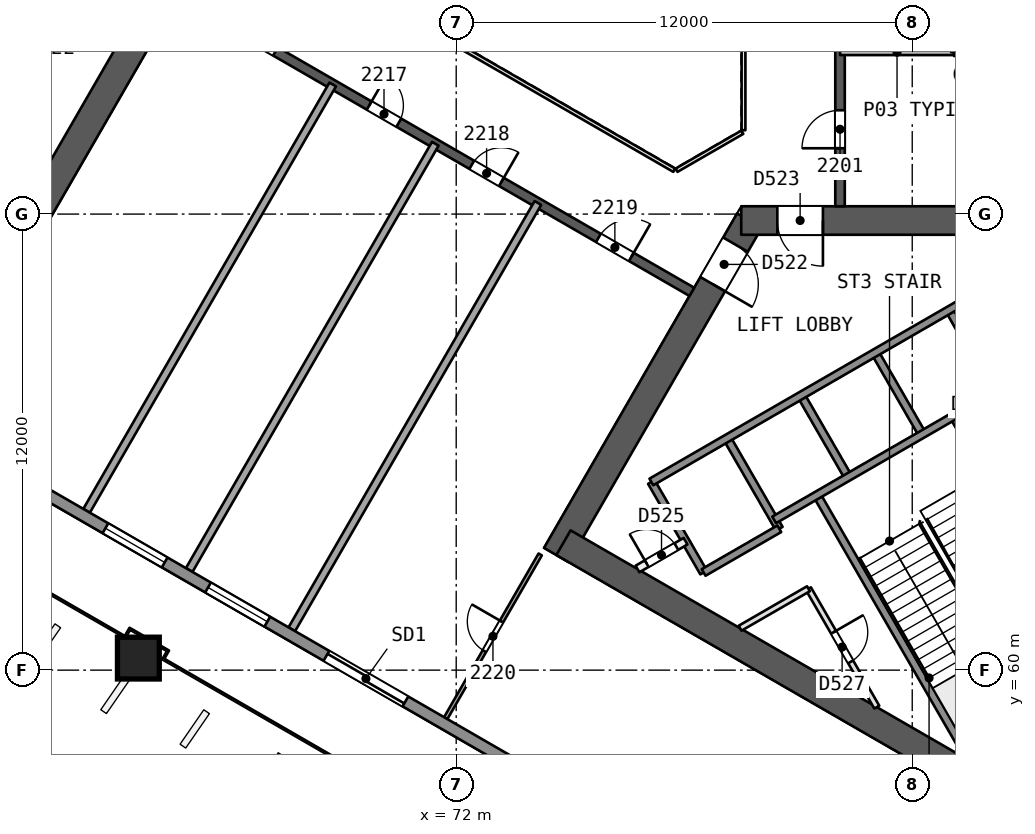
"""IFC4 building model, lengths in metres.
Left out: names, types, materials, properties, quantities, classifications, styles, units other than length and angle.
Written with IfcOpenShell. Run it as: python <this file> out.ifc"""

import sys

from ifc_helpers import new_model, si_unit, direction, frame, frame_2d, origin, origin_2d, place, context, subcontext, project, spatial, rectangle, extrude, element, fill, save


model = new_model("IFC4")
c1 = context("Model", 3, precision=1e-05, world=origin(), true_north=direction((0.0, 1.0)))
c2 = subcontext(c1, "Body", "Model", "MODEL_VIEW")
j1 = project(units=[si_unit("LENGTHUNIT", "METRE"), si_unit("PLANEANGLEUNIT", "RADIAN")], contexts=[c1])
p1 = place(None, origin())
s1 = spatial("IfcSite", under=j1, at=p1, CompositionType="ELEMENT")
p2 = place(p1, origin())
s2 = spatial("IfcBuilding", under=s1, at=p2, CompositionType="ELEMENT")
p3 = place(p2, frame((0.0, 0.0, 94.3)))
s3 = spatial("IfcBuildingStorey", under=s2, at=p3, CompositionType="ELEMENT", Elevation=94.3)
p4 = place(p3, frame((60.673, 71.523, 0.0), z_axis=(0.0, 0.0, 1.0), x_axis=(0.499997052475, 0.866027105532, 0.0)))
e1 = element("IfcWall", 1, at=p4, inside=s3, PredefinedType="SHEAR", context=c2, shape_type="SweptSolid", body=[
    extrude(rectangle(XDim=10.005, YDim=0.75, at=frame_2d((5.002, 0.0))), origin(), (0.0, 0.0, 1.0), 3.7),
])
p5 = place(p4, frame((7.855, 0.0, 0.0)))
e2 = element("IfcOpeningElement", 2, at=p5, cuts=e1, PredefinedType="OPENING", context=c2, shape_type="SweptSolid", body=[
    extrude(rectangle(XDim=1.2, YDim=2.1, at=frame_2d((0.6, 1.05))), frame((0.0, 0.385, 0.0), z_axis=(0.0, -1.0, 0.0), x_axis=(1.0, 0.0, 0.0)), (0.0, 0.0, 1.0), 0.771),
])
p6 = place(p3, frame((79.717, 71.831, 0.0), z_axis=(0.0, 0.0, 1.0), x_axis=(-0.499996230114, -0.866027580318, 0.0)))
e3 = element("IfcWall", 3, at=p6, inside=s3, PredefinedType="SHEAR", context=c2, shape_type="SweptSolid", body=[
    extrude(rectangle(XDim=10.164, YDim=0.75, at=frame_2d((5.082, 0.0))), origin(), (0.0, 0.0, 1.0), 3.7),
])
p7 = place(p6, frame((0.733, 0.0, 0.0)))
e4 = element("IfcOpeningElement", 4, at=p7, cuts=e3, PredefinedType="OPENING", context=c2, shape_type="SweptSolid", body=[
    extrude(rectangle(XDim=1.2, YDim=2.1, at=frame_2d((0.6, 1.05))), frame((0.0, 0.385, 0.0), z_axis=(0.0, -1.0, 0.0), x_axis=(1.0, 0.0, 0.0)), (0.0, 0.0, 1.0), 0.771),
])
p8 = place(p3, frame((74.822, 63.354, 0.0), z_axis=(0.0, 0.0, 1.0), x_axis=(0.8660248072, -0.500001033313, 0.0)))
e5 = element("IfcWall", 5, at=p8, inside=s3, PredefinedType="SHEAR", context=c2, shape_type="SweptSolid", body=[
    extrude(rectangle(XDim=13.958, YDim=0.75, at=frame_2d((6.979, 0.0))), origin(), (0.0, 0.0, 1.0), 3.7),
])
p9 = place(p3, frame((89.505, 71.831, 0.0), z_axis=(0.0, 0.0, 1.0), x_axis=(-1.0, 0.0, 0.0)))
e6 = element("IfcWall", 6, at=p9, inside=s3, PredefinedType="SHEAR", context=c2, shape_type="SweptSolid", body=[
    extrude(rectangle(XDim=10.005, YDim=0.75, at=frame_2d((5.002, 0.0))), origin(), (0.0, 0.0, 1.0), 3.7),
])
p10 = place(p9, frame((7.855, 0.0, 0.0)))
e7 = element("IfcOpeningElement", 7, at=p10, cuts=e6, PredefinedType="OPENING", context=c2, shape_type="SweptSolid", body=[
    extrude(rectangle(XDim=1.2, YDim=2.1, at=frame_2d((0.6, 1.05))), frame((0.0, 0.385, 0.0), z_axis=(0.0, -1.0, 0.0), x_axis=(1.0, 0.0, 0.0)), (0.0, 0.0, 1.0), 0.771),
])
p11 = place(p3, frame((82.1, 72.206, 0.0), z_axis=(0.0, 0.0, 1.0), x_axis=(0.0, 1.0, 0.0)))
e8 = element("IfcWall", 8, at=p11, inside=s3, PredefinedType="SHEAR", context=c2, shape_type="SweptSolid", body=[
    extrude(rectangle(XDim=15.588, YDim=0.25, at=frame_2d((7.794, 0.0))), origin(), (0.0, 0.0, 1.0), 3.25),
])
p12 = place(p11, frame((1.527, 0.0, 0.0)))
e9 = element("IfcOpeningElement", 9, at=p12, cuts=e8, PredefinedType="OPENING", context=c2, shape_type="SweptSolid", body=[
    extrude(rectangle(XDim=1.0, YDim=2.1, at=frame_2d((0.5, 1.05))), frame((0.0, 0.135, 0.0), z_axis=(0.0, -1.0, 0.0), x_axis=(1.0, 0.0, 0.0)), (0.0, 0.0, 1.0), 0.271),
])
p13 = place(p11, frame((8.694, 0.0, 0.0)))
e10 = element("IfcOpeningElement", 10, at=p13, cuts=e8, PredefinedType="OPENING", context=c2, shape_type="SweptSolid", body=[
    extrude(rectangle(XDim=1.1, YDim=2.1, at=frame_2d((0.55, 1.05))), frame((0.0, 0.135, 0.0), z_axis=(0.0, -1.0, 0.0), x_axis=(1.0, 0.0, 0.0)), (0.0, 0.0, 1.0), 0.271),
])
p14 = place(p11, frame((13.062, 0.0, 0.0)))
e11 = element("IfcOpeningElement", 11, at=p14, cuts=e8, PredefinedType="OPENING", context=c2, shape_type="SweptSolid", body=[
    extrude(rectangle(XDim=1.0, YDim=2.1, at=frame_2d((0.5, 1.05))), frame((0.0, 0.135, 0.0), z_axis=(0.0, -1.0, 0.0), x_axis=(1.0, 0.0, 0.0)), (0.0, 0.0, 1.0), 0.271),
])
p15 = place(p3, frame((64.7, 77.748, 0.0), z_axis=(0.0, 0.0, 1.0), x_axis=(0.866026492143, -0.499998114903, 0.0)))
e12 = element("IfcWall", 12, at=p15, inside=s3, PredefinedType="SHEAR", context=c2, shape_type="SweptSolid", body=[
    extrude(rectangle(XDim=15.588, YDim=0.25, at=frame_2d((7.794, 0.0))), origin(), (0.0, 0.0, 1.0), 3.25),
])
p16 = place(p15, frame((1.738, 0.0, 0.0)))
e13 = element("IfcOpeningElement", 13, at=p16, cuts=e12, PredefinedType="OPENING", context=c2, shape_type="SweptSolid", body=[
    extrude(rectangle(XDim=1.2, YDim=2.4, at=frame_2d((0.6, 1.2))), frame((0.0, 0.135, 0.0), z_axis=(0.0, -1.0, 0.0), x_axis=(1.0, 0.0, 0.0)), (0.0, 0.0, 1.0), 0.271),
])
p17 = place(p15, frame((5.785, 0.0, 0.0)))
e14 = element("IfcOpeningElement", 14, at=p17, cuts=e12, PredefinedType="OPENING", context=c2, shape_type="SweptSolid", body=[
    extrude(rectangle(XDim=0.9, YDim=2.1, at=frame_2d((0.45, 1.05))), frame((0.0, 0.135, 0.0), z_axis=(0.0, -1.0, 0.0), x_axis=(1.0, 0.0, 0.0)), (0.0, 0.0, 1.0), 0.271),
])
p18 = place(p15, frame((8.903, 0.0, 0.0)))
e15 = element("IfcOpeningElement", 15, at=p18, cuts=e12, PredefinedType="OPENING", context=c2, shape_type="SweptSolid", body=[
    extrude(rectangle(XDim=0.9, YDim=2.1, at=frame_2d((0.45, 1.05))), frame((0.0, 0.135, 0.0), z_axis=(0.0, -1.0, 0.0), x_axis=(1.0, 0.0, 0.0)), (0.0, 0.0, 1.0), 0.271),
])
p19 = place(p15, frame((12.75, 0.0, 0.0)))
e16 = element("IfcOpeningElement", 16, at=p19, cuts=e12, PredefinedType="OPENING", context=c2, shape_type="SweptSolid", body=[
    extrude(rectangle(XDim=1.0, YDim=2.1, at=frame_2d((0.5, 1.05))), frame((0.0, 0.135, 0.0), z_axis=(0.0, -1.0, 0.0), x_axis=(1.0, 0.0, 0.0)), (0.0, 0.0, 1.0), 0.271),
])
p20 = place(p3, frame((63.624, 60.296, 0.0), z_axis=(0.010093620709, 0.017482414954, 0.999796221231), x_axis=(-0.86603178719, 0.499988943453, 3.82278e-07)))
e17 = element("IfcColumn", 17, at=p20, inside=s3, PredefinedType="COLUMN", context=c2, shape_type="SweptSolid", body=[
    extrude(rectangle(XDim=1.1, YDim=1.1, at=origin_2d()), origin(), (0.0, 0.0, 1.0), 3.701),
])
p21 = place(p3, frame((95.053, 76.259, 0.0), z_axis=(0.0, 0.0, 1.0), x_axis=(-1.0, 0.0, 0.0)))
e18 = element("IfcWall", 18, at=p21, inside=s3, PredefinedType="PARTITIONING", context=c2, shape_type="SweptSolid", body=[
    extrude(rectangle(XDim=9.953, YDim=0.2, at=frame_2d((4.976, 0.0))), origin(), (0.0, 0.0, 1.0), 3.25),
])
p22 = place(p3, frame((85.1, 76.259, 0.0), z_axis=(0.0, 0.0, 1.0), x_axis=(-1.0, 0.0, 0.0)))
e19 = element("IfcWall", 19, at=p22, inside=s3, PredefinedType="PARTITIONING", context=c2, shape_type="SweptSolid", body=[
    extrude(rectangle(XDim=3.0, YDim=0.15, at=frame_2d((1.5, 0.0))), origin(), (0.0, 0.0, 1.0), 3.25),
])
for number, where, z_axis, x_axis in (
    (20, (62.274, 64.193, 0.0), (0.0, 0.0, 1.0), (0.5, 0.866, 0.0)),
    (21, (64.974, 62.634, 0.0), (0.0, 0.0, 1.0), (0.5, 0.866, 0.0)),
    (22, (67.674, 61.075, 0.0), (0.0, 0.0, 1.0), (0.5, 0.866, 0.0)),
):
    element("IfcWall", number, at=place(p3, frame(where, z_axis=z_axis, x_axis=x_axis)), inside=s3, PredefinedType="PARTITIONING", context=c2, shape_type="SweptSolid", body=[
        extrude(rectangle(XDim=12.953, YDim=0.2, at=frame_2d((6.477, 0.0))), origin(), (0.0, 0.0, 1.0), 3.25),
    ])
p23 = place(p3, frame((71.724, 58.737, 0.0), z_axis=(0.0, 0.0, 1.0), x_axis=(0.499971721724, 0.866041729639, 0.0)))
e23 = element("IfcWall", 23, at=p23, inside=s3, PredefinedType="PARTITIONING", context=c2, shape_type="SweptSolid", body=[
    extrude(rectangle(XDim=4.974, YDim=0.1, at=frame_2d((2.487, 0.0))), origin(), (0.0, 0.0, 1.0), 3.25),
])
p24 = place(p23, frame((2.037, 0.0, 0.0)))
e24 = element("IfcOpeningElement", 24, at=p24, cuts=e23, PredefinedType="OPENING", context=c2, shape_type="SweptSolid", body=[
    extrude(rectangle(XDim=0.9, YDim=2.1, at=frame_2d((0.45, 1.05))), frame((0.0, 0.061, 0.0), z_axis=(0.0, -1.0, 0.0), x_axis=(1.0, 0.0, 0.0)), (0.0, 0.0, 1.0), 0.121),
])
p25 = place(p3, frame((90.054, 47.981, 0.0), z_axis=(0.0, 0.0, 1.0), x_axis=(-0.866025390357, 0.500000023256, 0.0)))
e25 = element("IfcWall", 25, at=p25, inside=s3, PredefinedType="SOLIDWALL", context=c2, shape_type="SweptSolid", body=[
    extrude(rectangle(XDim=58.093, YDim=0.3, at=frame_2d((29.046, 0.0))), origin(), (0.0, 0.0, 1.0), 3.25),
])
p26 = place(p25, frame((43.972, 0.0, 0.0)))
e26 = element("IfcOpeningElement", 26, at=p26, cuts=e25, PredefinedType="OPENING", context=c2, shape_type="SweptSolid", body=[
    extrude(rectangle(XDim=2.4, YDim=2.4, at=frame_2d((1.2, 1.2))), frame((0.0, 0.161, 0.0), z_axis=(0.0, -1.0, 0.0), x_axis=(1.0, 0.0, 0.0)), (0.0, 0.0, 1.0), 0.321),
])
p27 = place(p25, frame((22.39, 0.0, 0.0)))
e27 = element("IfcOpeningElement", 27, at=p27, cuts=e25, PredefinedType="OPENING", context=c2, shape_type="SweptSolid", body=[
    extrude(rectangle(XDim=2.4, YDim=2.4, at=frame_2d((1.2, 1.2))), frame((0.0, 0.161, 0.0), z_axis=(0.0, -1.0, 0.0), x_axis=(1.0, 0.0, 0.0)), (0.0, 0.0, 1.0), 0.321),
])
p28 = place(p25, frame((10.643, 0.0, 0.0)))
e28 = element("IfcOpeningElement", 28, at=p28, cuts=e25, PredefinedType="OPENING", context=c2, shape_type="SweptSolid", body=[
    extrude(rectangle(XDim=2.4, YDim=2.4, at=frame_2d((1.2, 1.2))), frame((0.0, 0.161, 0.0), z_axis=(0.0, -1.0, 0.0), x_axis=(1.0, 0.0, 0.0)), (0.0, 0.0, 1.0), 0.321),
])
p29 = place(p25, frame((29.705, 0.0, 0.9)))
e29 = element("IfcOpeningElement", 29, at=p29, cuts=e25, PredefinedType="OPENING", context=c2, shape_type="SweptSolid", body=[
    extrude(rectangle(XDim=1.8, YDim=1.5, at=frame_2d((0.9, 0.75))), frame((0.0, 0.161, 0.0), z_axis=(0.0, -1.0, 0.0), x_axis=(1.0, 0.0, 0.0)), (0.0, 0.0, 1.0), 0.321),
])
p30 = place(p25, frame((26.587, 0.0, 0.9)))
e30 = element("IfcOpeningElement", 30, at=p30, cuts=e25, PredefinedType="OPENING", context=c2, shape_type="SweptSolid", body=[
    extrude(rectangle(XDim=1.8, YDim=1.5, at=frame_2d((0.9, 0.75))), frame((0.0, 0.161, 0.0), z_axis=(0.0, -1.0, 0.0), x_axis=(1.0, 0.0, 0.0)), (0.0, 0.0, 1.0), 0.321),
])
p31 = place(p3, frame((77.135, 64.952, 0.0), z_axis=(0.0, 0.0, 1.0), x_axis=(0.499996545922, -0.866027397988, 0.0)))
e31 = element("IfcWall", 31, at=p31, inside=s3, PredefinedType="SOLIDWALL", context=c2, shape_type="SweptSolid", body=[
    extrude(rectangle(XDim=2.75, YDim=0.2, at=frame_2d((1.375, 0.0))), origin(), (0.0, 0.0, 1.0), 3.25),
])
p32 = place(p3, frame((81.269, 62.142, 0.0), z_axis=(0.0, 0.0, 1.0), x_axis=(0.500043557135, -0.866000254601, 0.0)))
e32 = element("IfcWall", 32, at=p32, inside=s3, PredefinedType="PARTITIONING", context=c2, shape_type="SweptSolid", body=[
    extrude(rectangle(XDim=3.598, YDim=0.15, at=frame_2d((1.799, 0.0))), origin(), (0.0, 0.0, 1.0), 3.25),
])
p33 = place(p32, frame((1.322, 0.0, 0.0)))
e33 = element("IfcOpeningElement", 33, at=p33, cuts=e32, PredefinedType="OPENING", context=c2, shape_type="SweptSolid", body=[
    extrude(rectangle(XDim=0.9, YDim=2.1, at=frame_2d((0.45, 1.05))), frame((0.0, 0.085, 0.0), z_axis=(0.0, -1.0, 0.0), x_axis=(1.0, 0.0, 0.0)), (0.0, 0.0, 1.0), 0.171),
])
p34 = place(p3, frame((79.127, 66.102, 0.0), z_axis=(0.0, 0.0, 1.0), x_axis=(0.499996545922, -0.866027397988, 0.0)))
e34 = element("IfcWall", 34, at=p34, inside=s3, PredefinedType="SOLIDWALL", context=c2, shape_type="SweptSolid", body=[
    extrude(rectangle(XDim=2.75, YDim=0.2, at=frame_2d((1.375, 0.0))), origin(), (0.0, 0.0, 1.0), 3.25),
])
p35 = place(p3, frame((81.493, 64.604, 0.0), z_axis=(0.0, 0.0, 1.0), x_axis=(0.500006057782, -0.866021906294, 0.0)))
e35 = element("IfcWall", 35, at=p35, inside=s3, PredefinedType="SOLIDWALL", context=c2, shape_type="SweptSolid", body=[
    extrude(rectangle(XDim=7.7, YDim=0.2, at=frame_2d((3.85, 0.0))), origin(), (0.0, 0.0, 1.0), 3.25),
])
for number, where, z_axis, x_axis in (
    (36, (81.076, 67.227, 0.0), (0.0, 0.0, 1.0), (0.5, -0.866, 0.0)),
    (37, (83.024, 68.352, 0.0), (0.0, 0.0, 1.0), (0.5, -0.866, 0.0)),
):
    element("IfcWall", number, at=place(p3, frame(where, z_axis=z_axis, x_axis=x_axis)), inside=s3, PredefinedType="SOLIDWALL", context=c2, shape_type="SweptSolid", body=[
        extrude(rectangle(XDim=2.48, YDim=0.2, at=frame_2d((1.24, 0.0))), origin(), (0.0, 0.0, 1.0), 3.25),
    ])
p36 = place(p3, frame((85.087, 66.679, 0.0), z_axis=(0.0, 0.0, 1.0), x_axis=(0.500019787375, -0.866013979237, 0.0)))
e38 = element("IfcWall", 38, at=p36, inside=s3, PredefinedType="SOLIDWALL", context=c2, shape_type="SweptSolid", body=[
    extrude(rectangle(XDim=7.7, YDim=0.2, at=frame_2d((3.85, 0.0))), origin(), (0.0, 0.0, 1.0), 3.25),
])
p37 = place(p36, frame((0.55, 0.0, 0.0)))
e39 = element("IfcOpeningElement", 39, at=p37, cuts=e38, PredefinedType="OPENING", context=c2, shape_type="SweptSolid", body=[
    extrude(rectangle(XDim=1.1, YDim=2.1, at=frame_2d((0.55, 1.05))), frame((0.0, 0.11, 0.0), z_axis=(0.0, -1.0, 0.0), x_axis=(1.0, 0.0, 0.0)), (0.0, 0.0, 1.0), 0.221),
])
p38 = place(p3, frame((84.973, 69.477, 0.0), z_axis=(0.0, 0.0, 1.0), x_axis=(0.499996545922, -0.866027397988, 0.0)))
e40 = element("IfcWall", 40, at=p38, inside=s3, PredefinedType="SOLIDWALL", context=c2, shape_type="SweptSolid", body=[
    extrude(rectangle(XDim=2.75, YDim=0.2, at=frame_2d((1.375, 0.0))), origin(), (0.0, 0.0, 1.0), 3.25),
])
p39 = place(p3, frame((77.135, 64.952, 0.0), z_axis=(0.0, 0.0, 1.0), x_axis=(0.866031916153, 0.499988720078, 0.0)))
e41 = element("IfcWall", 41, at=p39, inside=s3, PredefinedType="SOLIDWALL", context=c2, shape_type="SweptSolid", body=[
    extrude(rectangle(XDim=11.35, YDim=0.2, at=frame_2d((5.675, 0.0))), origin(), (0.0, 0.0, 1.0), 3.25),
])
p40 = place(p3, frame((76.77, 62.662, 0.0), z_axis=(0.0, 0.0, 1.0), x_axis=(0.866054810376, 0.49994906283, 0.0)))
e42 = element("IfcWall", 42, at=p40, inside=s3, PredefinedType="PARTITIONING", context=c2, shape_type="SweptSolid", body=[
    extrude(rectangle(XDim=1.461, YDim=0.2, at=frame_2d((0.73, 0.0))), origin(), (0.0, 0.0, 1.0), 3.25),
])
p41 = place(p40, frame((0.281, 0.0, 0.0)))
e43 = element("IfcOpeningElement", 43, at=p41, cuts=e42, PredefinedType="OPENING", context=c2, shape_type="SweptSolid", body=[
    extrude(rectangle(XDim=0.9, YDim=2.1, at=frame_2d((0.45, 1.05))), frame((0.0, 0.11, 0.0), z_axis=(0.0, -1.0, 0.0), x_axis=(1.0, 0.0, 0.0)), (0.0, 0.0, 1.0), 0.221),
])
p42 = place(p3, frame((80.367, 63.954, 0.0), z_axis=(0.0, 0.0, 1.0), x_axis=(0.866026575979, 0.499997969693, 0.0)))
e44 = element("IfcWall", 44, at=p42, inside=s3, PredefinedType="SOLIDWALL", context=c2, shape_type="SweptSolid", body=[
    extrude(rectangle(XDim=6.75, YDim=0.2, at=frame_2d((3.375, 0.0))), origin(), (0.0, 0.0, 1.0), 3.25),
])
p43 = place(p3, frame((78.51, 62.57, 0.0), z_axis=(0.0, 0.0, 1.0), x_axis=(0.866053019151, 0.499952165731, 0.0)))
e45 = element("IfcWall", 45, at=p43, inside=s3, PredefinedType="SOLIDWALL", context=c2, shape_type="SweptSolid", body=[
    extrude(rectangle(XDim=2.3, YDim=0.2, at=frame_2d((1.15, 0.0))), origin(), (0.0, 0.0, 1.0), 3.25),
])
p44 = place(p3, frame((79.47, 61.103, 0.0), z_axis=(0.0, 0.0, 1.0), x_axis=(0.866021168401, 0.500007335828, 0.0)))
e46 = element("IfcWall", 46, at=p44, inside=s3, PredefinedType="PARTITIONING", context=c2, shape_type="SweptSolid", body=[
    extrude(rectangle(XDim=2.077, YDim=0.15, at=frame_2d((1.039, 0.0))), origin(), (0.0, 0.0, 1.0), 3.25),
])
for number, where, z_axis, x_axis in (
    (47, (79.56, 74.206, 0.0), (0.0, 0.0, 1.0), (0.0, 1.0, 0.0)),
    (48, (67.702, 78.948, 0.0), (0.0, 0.0, 1.0), (0.866, -0.5, 0.0)),
):
    element("IfcWall", number, at=place(p3, frame(where, z_axis=z_axis, x_axis=x_axis)), inside=s3, PredefinedType="PARTITIONING", context=c2, shape_type="SweptSolid", body=[
        extrude(rectangle(XDim=11.588, YDim=0.1, at=frame_2d((5.794, 0.0))), origin(), (0.0, 0.0, 1.0), 3.25),
    ])
p45 = place(p3, frame((77.798, 73.154, 0.0), z_axis=(0.0, 0.0, 1.0), x_axis=(0.866041268327, 0.499972520799, 0.0)))
e49 = element("IfcWall", 49, at=p45, inside=s3, PredefinedType="PARTITIONING", context=c2, shape_type="SweptSolid", body=[
    extrude(rectangle(XDim=2.0, YDim=0.1, at=frame_2d((1.0, 0.0))), origin(), (0.0, 0.0, 1.0), 3.25),
])
p46 = place(p12, origin())
e50 = element("IfcDoor", 50, at=p46, inside=s3, OperationType="SINGLE_SWING_LEFT", PredefinedType="NOTDEFINED", context=c2, shape_type="SweptSolid", body=[
    extrude(rectangle(XDim=1.0, YDim=2.1, at=frame_2d((0.5, 1.05))), frame((0.0, 0.025, 0.0), z_axis=(0.0, -1.0, 0.0), x_axis=(1.0, 0.0, 0.0)), (0.0, 0.0, 1.0), 0.05),
])
fill(e9, e50)
p47 = place(p17, origin())
e51 = element("IfcDoor", 51, at=p47, inside=s3, OperationType="SINGLE_SWING_LEFT", PredefinedType="NOTDEFINED", context=c2, shape_type="SweptSolid", body=[
    extrude(rectangle(XDim=0.9, YDim=2.1, at=frame_2d((0.45, 1.05))), frame((0.0, 0.025, 0.0), z_axis=(0.0, -1.0, 0.0), x_axis=(1.0, 0.0, 0.0)), (0.0, 0.0, 1.0), 0.05),
])
fill(e14, e51)
p48 = place(p18, origin())
e52 = element("IfcDoor", 52, at=p48, inside=s3, OperationType="SINGLE_SWING_RIGHT", PredefinedType="NOTDEFINED", context=c2, shape_type="SweptSolid", body=[
    extrude(rectangle(XDim=0.9, YDim=2.1, at=frame_2d((0.45, 1.05))), frame((0.0, 0.025, 0.0), z_axis=(0.0, -1.0, 0.0), x_axis=(1.0, 0.0, 0.0)), (0.0, 0.0, 1.0), 0.05),
])
fill(e15, e52)
p49 = place(p19, origin())
e53 = element("IfcDoor", 53, at=p49, inside=s3, OperationType="SINGLE_SWING_RIGHT", PredefinedType="NOTDEFINED", context=c2, shape_type="SweptSolid", body=[
    extrude(rectangle(XDim=1.0, YDim=2.1, at=frame_2d((0.5, 1.05))), frame((0.0, 0.025, 0.0), z_axis=(0.0, -1.0, 0.0), x_axis=(1.0, 0.0, 0.0)), (0.0, 0.0, 1.0), 0.05),
])
fill(e16, e53)
p50 = place(p24, origin())
e54 = element("IfcDoor", 54, at=p50, inside=s3, OperationType="SINGLE_SWING_RIGHT", PredefinedType="NOTDEFINED", context=c2, shape_type="SweptSolid", body=[
    extrude(rectangle(XDim=0.9, YDim=2.1, at=frame_2d((0.45, 1.05))), frame((0.0, 0.025, 0.0), z_axis=(0.0, -1.0, 0.0), x_axis=(1.0, 0.0, 0.0)), (0.0, 0.0, 1.0), 0.05),
])
fill(e24, e54)
p51 = place(p27, origin())
e55 = element("IfcDoor", 55, at=p51, inside=s3, OperationType="SLIDING_TO_RIGHT", PredefinedType="NOTDEFINED", context=c2, shape_type="SweptSolid", body=[
    extrude(rectangle(XDim=2.4, YDim=2.4, at=frame_2d((1.2, 1.2))), frame((0.0, 0.025, 0.0), z_axis=(0.0, -1.0, 0.0), x_axis=(1.0, 0.0, 0.0)), (0.0, 0.0, 1.0), 0.05),
])
fill(e27, e55)
p52 = place(p29, origin())
e56 = element("IfcWindow", 56, at=p52, inside=s3, PartitioningType="SINGLE_PANEL", PredefinedType="WINDOW", context=c2, shape_type="SweptSolid", body=[
    extrude(rectangle(XDim=1.8, YDim=1.5, at=frame_2d((0.9, 0.75))), frame((0.0, 0.03, 0.0), z_axis=(0.0, -1.0, 0.0), x_axis=(1.0, 0.0, 0.0)), (0.0, 0.0, 1.0), 0.06),
])
fill(e29, e56)
p53 = place(p30, origin())
e57 = element("IfcWindow", 57, at=p53, inside=s3, PartitioningType="SINGLE_PANEL", PredefinedType="WINDOW", context=c2, shape_type="SweptSolid", body=[
    extrude(rectangle(XDim=1.8, YDim=1.5, at=frame_2d((0.9, 0.75))), frame((0.0, 0.03, 0.0), z_axis=(0.0, -1.0, 0.0), x_axis=(1.0, 0.0, 0.0)), (0.0, 0.0, 1.0), 0.06),
])
fill(e30, e57)
p54 = place(p7, origin())
e58 = element("IfcDoor", 58, at=p54, inside=s3, OperationType="SINGLE_SWING_RIGHT", PredefinedType="NOTDEFINED", context=c2, shape_type="SweptSolid", body=[
    extrude(rectangle(XDim=1.2, YDim=2.1, at=frame_2d((0.6, 1.05))), frame((0.0, 0.025, 0.0), z_axis=(0.0, -1.0, 0.0), x_axis=(1.0, 0.0, 0.0)), (0.0, 0.0, 1.0), 0.05),
])
fill(e4, e58)
p55 = place(p10, origin())
e59 = element("IfcDoor", 59, at=p55, inside=s3, OperationType="SINGLE_SWING_LEFT", PredefinedType="NOTDEFINED", context=c2, shape_type="SweptSolid", body=[
    extrude(rectangle(XDim=1.2, YDim=2.1, at=frame_2d((0.6, 1.05))), frame((0.0, 0.025, 0.0), z_axis=(0.0, -1.0, 0.0), x_axis=(1.0, 0.0, 0.0)), (0.0, 0.0, 1.0), 0.05),
])
fill(e7, e59)
p56 = place(p41, origin())
e60 = element("IfcDoor", 60, at=p56, inside=s3, OperationType="SINGLE_SWING_LEFT", PredefinedType="NOTDEFINED", context=c2, shape_type="SweptSolid", body=[
    extrude(rectangle(XDim=0.9, YDim=2.1, at=frame_2d((0.45, 1.05))), frame((0.0, 0.025, 0.0), z_axis=(0.0, -1.0, 0.0), x_axis=(1.0, 0.0, 0.0)), (0.0, 0.0, 1.0), 0.05),
])
fill(e43, e60)
p57 = place(p33, origin())
e61 = element("IfcDoor", 61, at=p57, inside=s3, OperationType="SINGLE_SWING_LEFT", PredefinedType="NOTDEFINED", context=c2, shape_type="SweptSolid", body=[
    extrude(rectangle(XDim=0.9, YDim=2.1, at=frame_2d((0.45, 1.05))), frame((0.0, 0.025, 0.0), z_axis=(0.0, -1.0, 0.0), x_axis=(1.0, 0.0, 0.0)), (0.0, 0.0, 1.0), 0.05),
])
fill(e33, e61)
save(model, sys.argv[1])
